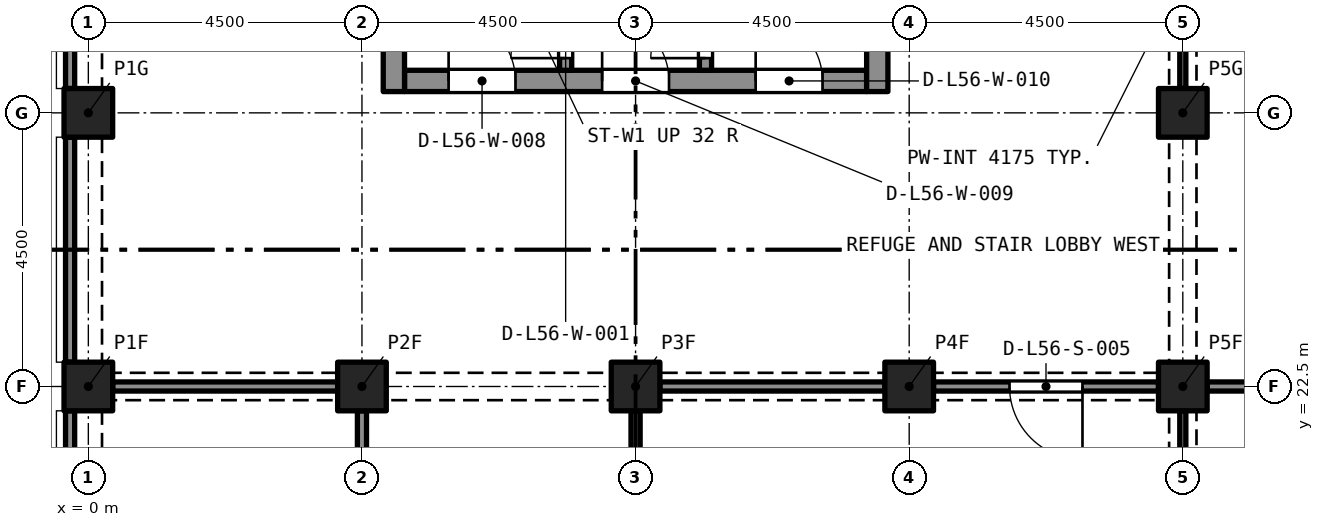
"""IFC4 building model, lengths in metres.
Left out: names, types, materials, properties, quantities, classifications, styles, units other than length and angle.
Written with IfcOpenShell. Run it as: python <this file> out.ifc"""

import sys

from ifc_helpers import new_model, si_unit, direction, frame, frame_2d, origin, origin_2d, place, context, subcontext, project, spatial, rectangle, extrude, element, fill, save


model = new_model("IFC4")
c1 = context("Model", 3, precision=1e-05, world=origin(), true_north=direction((0.0, 1.0)))
c2 = subcontext(c1, "Body", "Model", "MODEL_VIEW")
j1 = project(units=[si_unit("LENGTHUNIT", "METRE"), si_unit("PLANEANGLEUNIT", "RADIAN")], contexts=[c1])
p1 = place(None, origin())
s1 = spatial("IfcSite", under=j1, at=p1, CompositionType="ELEMENT")
p2 = place(p1, origin())
s2 = spatial("IfcBuilding", under=s1, at=p2, CompositionType="ELEMENT")
p3 = place(p2, frame((0.0, 0.0, 201.9)))
s3 = spatial("IfcBuildingStorey", under=s2, at=p3, CompositionType="ELEMENT", Elevation=201.9)
for number, where, z_axis, x_axis in (
    (1, (0.0, 22.5, 0.0), (0.0, 0.0, 1.0), (1.0, 0.0, 0.0)),
    (2, (4.5, 22.5, 0.0), (0.0, 0.0, 1.0), (1.0, 0.0, 0.0)),
    (3, (9.0, 22.5, 0.0), (0.0, 0.0, 1.0), (1.0, 0.0, 0.0)),
    (4, (13.5, 22.5, 0.0), (0.0, 0.0, 1.0), (1.0, 0.0, 0.0)),
    (5, (18.0, 22.5, 0.0), (0.0, 0.0, 1.0), (1.0, 0.0, 0.0)),
    (6, (0.0, 27.0, 0.0), (0.0, 0.0, 1.0), (1.0, 0.0, 0.0)),
    (7, (18.0, 27.0, 0.0), (0.0, 0.0, 1.0), (1.0, 0.0, 0.0)),
):
    element("IfcColumn", number, at=place(p3, frame(where, z_axis=z_axis, x_axis=x_axis)), inside=s3, PredefinedType="COLUMN", context=c2, shape_type="SweptSolid", body=[
        extrude(rectangle(XDim=0.8, YDim=0.8, at=origin_2d()), origin(), (0.0, 0.0, 1.0), 4.995),
    ])
p4 = place(p3, frame((5.2, 27.525, 0.0), z_axis=(0.0, 0.0, 1.0), x_axis=(1.0, 0.0, 0.0)))
e8 = element("IfcWall", 8, at=p4, inside=s3, PredefinedType="SOLIDWALL", context=c2, shape_type="SweptSolid", body=[
    extrude(rectangle(XDim=7.6, YDim=0.35, at=frame_2d((3.8, 0.0))), origin(), (0.0, 0.0, 1.0), 4.995),
])
p5 = place(p4, frame((0.725, 0.0, 0.0)))
e9 = element("IfcOpeningElement", 9, at=p5, cuts=e8, PredefinedType="OPENING", context=c2, shape_type="SweptSolid", body=[
    extrude(rectangle(XDim=1.1, YDim=2.1, at=frame_2d((0.55, 1.05))), frame((0.0, 0.185, 0.0), z_axis=(0.0, -1.0, 0.0), x_axis=(1.0, 0.0, 0.0)), (0.0, 0.0, 1.0), 0.37),
])
p6 = place(p4, frame((3.25, 0.0, 0.0)))
e10 = element("IfcOpeningElement", 10, at=p6, cuts=e8, PredefinedType="OPENING", context=c2, shape_type="SweptSolid", body=[
    extrude(rectangle(XDim=1.1, YDim=2.1, at=frame_2d((0.55, 1.05))), frame((0.0, 0.185, 0.0), z_axis=(0.0, -1.0, 0.0), x_axis=(1.0, 0.0, 0.0)), (0.0, 0.0, 1.0), 0.37),
])
p7 = place(p4, frame((5.775, 0.0, 0.0)))
e11 = element("IfcOpeningElement", 11, at=p7, cuts=e8, PredefinedType="OPENING", context=c2, shape_type="SweptSolid", body=[
    extrude(rectangle(XDim=1.1, YDim=2.1, at=frame_2d((0.55, 1.05))), frame((0.0, 0.185, 0.0), z_axis=(0.0, -1.0, 0.0), x_axis=(1.0, 0.0, 0.0)), (0.0, 0.0, 1.0), 0.37),
])
p8 = place(p3, frame((5.025, 27.35, 0.0), z_axis=(0.0, 0.0, 1.0), x_axis=(0.0, 1.0, 0.0)))
e12 = element("IfcWall", 12, at=p8, inside=s3, PredefinedType="SOLIDWALL", context=c2, shape_type="SweptSolid", body=[
    extrude(rectangle(XDim=12.8, YDim=0.35, at=frame_2d((6.4, 0.0))), origin(), (0.0, 0.0, 1.0), 4.995),
])
p9 = place(p8, frame((8.6, 0.0, 0.0)))
e13 = element("IfcOpeningElement", 13, at=p9, cuts=e12, PredefinedType="OPENING", context=c2, shape_type="SweptSolid", body=[
    extrude(rectangle(XDim=1.2, YDim=2.1, at=frame_2d((0.6, 1.05))), frame((0.0, 0.185, 0.0), z_axis=(0.0, -1.0, 0.0), x_axis=(1.0, 0.0, 0.0)), (0.0, 0.0, 1.0), 0.37),
])
p10 = place(p3, frame((12.975, 27.35, 0.0), z_axis=(0.0, 0.0, 1.0), x_axis=(0.0, 1.0, 0.0)))
e14 = element("IfcWall", 14, at=p10, inside=s3, PredefinedType="SOLIDWALL", context=c2, shape_type="SweptSolid", body=[
    extrude(rectangle(XDim=12.8, YDim=0.35, at=frame_2d((6.4, 0.0))), origin(), (0.0, 0.0, 1.0), 4.995),
])
p11 = place(p10, frame((10.75, 0.0, 0.0)))
e15 = element("IfcOpeningElement", 15, at=p11, cuts=e14, PredefinedType="OPENING", context=c2, shape_type="SweptSolid", body=[
    extrude(rectangle(XDim=1.1, YDim=2.1, at=frame_2d((0.55, 1.05))), frame((0.0, 0.185, 0.0), z_axis=(0.0, -1.0, 0.0), x_axis=(1.0, 0.0, 0.0)), (0.0, 0.0, 1.0), 0.37),
])
p12 = place(p10, frame((8.6, 0.0, 0.0)))
e16 = element("IfcOpeningElement", 16, at=p12, cuts=e14, PredefinedType="OPENING", context=c2, shape_type="SweptSolid", body=[
    extrude(rectangle(XDim=1.2, YDim=2.1, at=frame_2d((0.6, 1.05))), frame((0.0, 0.185, 0.0), z_axis=(0.0, -1.0, 0.0), x_axis=(1.0, 0.0, 0.0)), (0.0, 0.0, 1.0), 0.37),
])
for number, where, z_axis, x_axis in (
    (17, (-0.3, 27.4, 0.0), (0.0, 0.0, 1.0), (0.0, 1.0, 0.0)),
    (18, (-0.3, 22.9, 0.0), (0.0, 0.0, 1.0), (0.0, 1.0, 0.0)),
    (19, (-0.3, 18.4, 0.0), (0.0, 0.0, 1.0), (0.0, 1.0, 0.0)),
):
    element("IfcWall", number, at=place(p3, frame(where, z_axis=z_axis, x_axis=x_axis)), inside=s3, PredefinedType="SOLIDWALL", context=c2, shape_type="SweptSolid", body=[
        extrude(rectangle(XDim=3.7, YDim=0.15, at=frame_2d((1.85, 0.0))), origin(), (0.0, 0.0, 1.0), 4.995),
    ])
p13 = place(p3, frame((7.85, 27.7, 0.0), z_axis=(0.0, 0.0, 1.0), x_axis=(0.0, 1.0, 0.0)))
e20 = element("IfcWall", 20, at=p13, inside=s3, PredefinedType="SOLIDWALL", context=c2, shape_type="SweptSolid", body=[
    extrude(rectangle(XDim=5.4, YDim=0.2, at=frame_2d((2.7, 0.0))), origin(), (0.0, 0.0, 1.0), 4.695),
])
p14 = place(p13, frame((0.2, 0.0, 0.0)))
e21 = element("IfcOpeningElement", 21, at=p14, cuts=e20, PredefinedType="OPENING", context=c2, shape_type="SweptSolid", body=[
    extrude(rectangle(XDim=0.9, YDim=2.1, at=frame_2d((0.45, 1.05))), frame((0.0, 0.11, 0.0), z_axis=(0.0, -1.0, 0.0), x_axis=(1.0, 0.0, 0.0)), (0.0, 0.0, 1.0), 0.22),
])
p15 = place(p3, frame((10.15, 27.7, 0.0), z_axis=(0.0, 0.0, 1.0), x_axis=(0.0, 1.0, 0.0)))
e22 = element("IfcWall", 22, at=p15, inside=s3, PredefinedType="SOLIDWALL", context=c2, shape_type="SweptSolid", body=[
    extrude(rectangle(XDim=5.4, YDim=0.2, at=frame_2d((2.7, 0.0))), origin(), (0.0, 0.0, 1.0), 4.695),
])
p16 = place(p15, frame((0.2, 0.0, 0.0)))
e23 = element("IfcOpeningElement", 23, at=p16, cuts=e22, PredefinedType="OPENING", context=c2, shape_type="SweptSolid", body=[
    extrude(rectangle(XDim=0.9, YDim=2.1, at=frame_2d((0.45, 1.05))), frame((0.0, 0.11, 0.0), z_axis=(0.0, -1.0, 0.0), x_axis=(1.0, 0.0, 0.0)), (0.0, 0.0, 1.0), 0.22),
])
p17 = place(p3, frame((18.0, 27.4, 0.0), z_axis=(0.0, 0.0, 1.0), x_axis=(0.0, 1.0, 0.0)))
e24 = element("IfcWall", 24, at=p17, inside=s3, PredefinedType="PARTITIONING", context=c2, shape_type="SweptSolid", body=[
    extrude(rectangle(XDim=3.7, YDim=0.1, at=frame_2d((1.85, 0.0))), origin(), (0.0, 0.0, 1.0), 4.175),
])
p18 = place(p3, frame((31.1, 22.5, 0.0), z_axis=(0.0, 0.0, 1.0), x_axis=(-1.0, 0.0, 0.0)))
e25 = element("IfcWall", 25, at=p18, inside=s3, PredefinedType="PARTITIONING", context=c2, shape_type="SweptSolid", body=[
    extrude(rectangle(XDim=12.7, YDim=0.15, at=frame_2d((6.35, 0.0))), origin(), (0.0, 0.0, 1.0), 4.545),
])
p19 = place(p18, frame((5.75, 0.0, 0.0)))
e26 = element("IfcOpeningElement", 26, at=p19, cuts=e25, PredefinedType="OPENING", context=c2, shape_type="SweptSolid", body=[
    extrude(rectangle(XDim=1.2, YDim=2.1, at=frame_2d((0.6, 1.05))), frame((0.0, 0.085, 0.0), z_axis=(0.0, -1.0, 0.0), x_axis=(1.0, 0.0, 0.0)), (0.0, 0.0, 1.0), 0.17),
])
p20 = place(p3, frame((18.0, 18.4, 0.0), z_axis=(0.0, 0.0, 1.0), x_axis=(0.0, 1.0, 0.0)))
e27 = element("IfcWall", 27, at=p20, inside=s3, PredefinedType="PARTITIONING", context=c2, shape_type="SweptSolid", body=[
    extrude(rectangle(XDim=3.7, YDim=0.1, at=frame_2d((1.85, 0.0))), origin(), (0.0, 0.0, 1.0), 4.175),
])
p21 = place(p3, frame((17.6, 22.5, 0.0), z_axis=(0.0, 0.0, 1.0), x_axis=(-1.0, 0.0, 0.0)))
e28 = element("IfcWall", 28, at=p21, inside=s3, PredefinedType="PARTITIONING", context=c2, shape_type="SweptSolid", body=[
    extrude(rectangle(XDim=3.7, YDim=0.15, at=frame_2d((1.85, 0.0))), origin(), (0.0, 0.0, 1.0), 4.175),
])
p22 = place(p21, frame((1.25, 0.0, 0.0)))
e29 = element("IfcOpeningElement", 29, at=p22, cuts=e28, PredefinedType="OPENING", context=c2, shape_type="SweptSolid", body=[
    extrude(rectangle(XDim=1.2, YDim=2.1, at=frame_2d((0.6, 1.05))), frame((0.0, 0.085, 0.0), z_axis=(0.0, -1.0, 0.0), x_axis=(1.0, 0.0, 0.0)), (0.0, 0.0, 1.0), 0.17),
])
for number, where, z_axis, x_axis in (
    (30, (9.4, 22.5, 0.0), (0.0, 0.0, 1.0), (1.0, 0.0, 0.0)),
    (31, (0.4, 22.5, 0.0), (0.0, 0.0, 1.0), (1.0, 0.0, 0.0)),
):
    element("IfcWall", number, at=place(p3, frame(where, z_axis=z_axis, x_axis=x_axis)), inside=s3, PredefinedType="PARTITIONING", context=c2, shape_type="SweptSolid", body=[
        extrude(rectangle(XDim=3.7, YDim=0.15, at=frame_2d((1.85, 0.0))), origin(), (0.0, 0.0, 1.0), 4.175),
    ])
p23 = place(p3, frame((9.0, 13.5, 0.0), z_axis=(0.0, 0.0, 1.0), x_axis=(0.0, 1.0, 0.0)))
e32 = element("IfcWall", 32, at=p23, inside=s3, PredefinedType="PARTITIONING", context=c2, shape_type="SweptSolid", body=[
    extrude(rectangle(XDim=8.6, YDim=0.15, at=frame_2d((4.3, 0.0))), origin(), (0.0, 0.0, 1.0), 4.695),
])
p24 = place(p3, frame((4.5, 13.5, 0.0), z_axis=(0.0, 0.0, 1.0), x_axis=(0.0, 1.0, 0.0)))
e33 = element("IfcWall", 33, at=p24, inside=s3, PredefinedType="PARTITIONING", context=c2, shape_type="SweptSolid", body=[
    extrude(rectangle(XDim=8.6, YDim=0.15, at=frame_2d((4.3, 0.0))), origin(), (0.0, 0.0, 1.0), 4.695),
])
p25 = place(p24, frame((3.8, 0.0, 0.0)))
e34 = element("IfcOpeningElement", 34, at=p25, cuts=e33, PredefinedType="OPENING", context=c2, shape_type="SweptSolid", body=[
    extrude(rectangle(XDim=1.0, YDim=2.1, at=frame_2d((0.5, 1.05))), frame((0.0, 0.085, 0.0), z_axis=(0.0, -1.0, 0.0), x_axis=(1.0, 0.0, 0.0)), (0.0, 0.0, 1.0), 0.17),
])
p26 = place(p14, origin())
e35 = element("IfcDoor", 35, at=p26, inside=s3, OperationType="SINGLE_SWING_LEFT", PredefinedType="DOOR", context=c2, shape_type="SweptSolid", body=[
    extrude(rectangle(XDim=0.9, YDim=2.1, at=frame_2d((0.45, 1.05))), frame((0.0, 0.025, 0.0), z_axis=(0.0, -1.0, 0.0), x_axis=(1.0, 0.0, 0.0)), (0.0, 0.0, 1.0), 0.05),
])
fill(e21, e35)
p27 = place(p16, origin())
e36 = element("IfcDoor", 36, at=p27, inside=s3, OperationType="SINGLE_SWING_LEFT", PredefinedType="DOOR", context=c2, shape_type="SweptSolid", body=[
    extrude(rectangle(XDim=0.9, YDim=2.1, at=frame_2d((0.45, 1.05))), frame((0.0, 0.025, 0.0), z_axis=(0.0, -1.0, 0.0), x_axis=(1.0, 0.0, 0.0)), (0.0, 0.0, 1.0), 0.05),
])
fill(e23, e36)
p28 = place(p5, origin())
e37 = element("IfcDoor", 37, at=p28, inside=s3, OperationType="SINGLE_SWING_LEFT", PredefinedType="DOOR", context=c2, shape_type="SweptSolid", body=[
    extrude(rectangle(XDim=1.1, YDim=2.1, at=frame_2d((0.55, 1.05))), frame((0.0, 0.025, 0.0), z_axis=(0.0, -1.0, 0.0), x_axis=(1.0, 0.0, 0.0)), (0.0, 0.0, 1.0), 0.05),
])
fill(e9, e37)
p29 = place(p6, origin())
e38 = element("IfcDoor", 38, at=p29, inside=s3, OperationType="SINGLE_SWING_LEFT", PredefinedType="DOOR", context=c2, shape_type="SweptSolid", body=[
    extrude(rectangle(XDim=1.1, YDim=2.1, at=frame_2d((0.55, 1.05))), frame((0.0, 0.025, 0.0), z_axis=(0.0, -1.0, 0.0), x_axis=(1.0, 0.0, 0.0)), (0.0, 0.0, 1.0), 0.05),
])
fill(e10, e38)
p30 = place(p7, origin())
e39 = element("IfcDoor", 39, at=p30, inside=s3, OperationType="SINGLE_SWING_LEFT", PredefinedType="DOOR", context=c2, shape_type="SweptSolid", body=[
    extrude(rectangle(XDim=1.1, YDim=2.1, at=frame_2d((0.55, 1.05))), frame((0.0, 0.025, 0.0), z_axis=(0.0, -1.0, 0.0), x_axis=(1.0, 0.0, 0.0)), (0.0, 0.0, 1.0), 0.05),
])
fill(e11, e39)
p31 = place(p22, origin())
e40 = element("IfcDoor", 40, at=p31, inside=s3, OperationType="SINGLE_SWING_LEFT", PredefinedType="DOOR", context=c2, shape_type="SweptSolid", body=[
    extrude(rectangle(XDim=1.2, YDim=2.1, at=frame_2d((0.6, 1.05))), frame((0.0, 0.025, 0.0), z_axis=(0.0, -1.0, 0.0), x_axis=(1.0, 0.0, 0.0)), (0.0, 0.0, 1.0), 0.05),
])
fill(e29, e40)
save(model, sys.argv[1])
